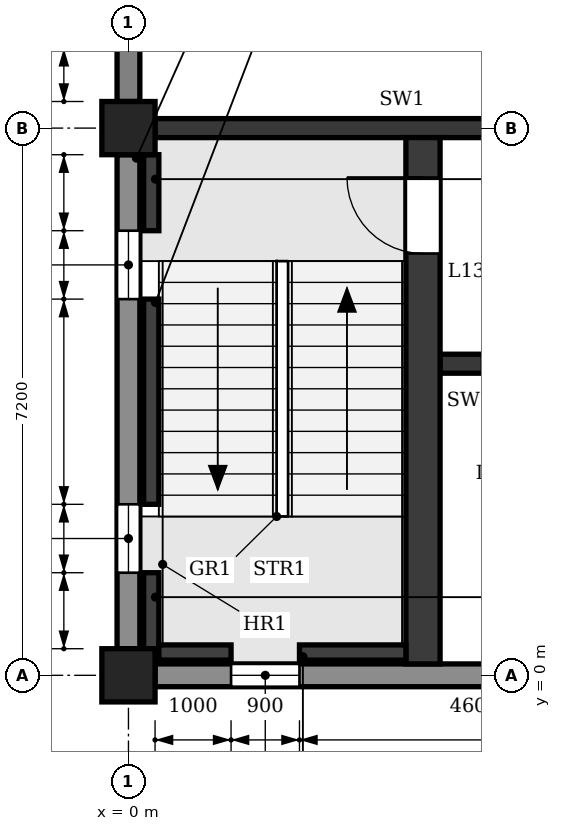
"""IFC4 building model, lengths in metres.
Left out: names, types, materials, properties, quantities, classifications, styles, units other than length and angle.
Written with IfcOpenShell. Run it as: python <this file> out.ifc"""

import sys

from ifc_helpers import new_model, si_unit, direction, frame, frame_2d, origin, origin_2d, place, context, subcontext, project, spatial, polyline, rectangle, outline, extrude, element, fill, save


model = new_model("IFC4")
c1 = context("Model", 3, precision=1e-05, world=origin(), true_north=direction((0.0, 1.0)))
c2 = subcontext(c1, "Body", "Model", "MODEL_VIEW")
j1 = project(units=[si_unit("LENGTHUNIT", "METRE"), si_unit("PLANEANGLEUNIT", "RADIAN")], contexts=[c1])
p1 = place(None, origin())
s1 = spatial("IfcSite", under=j1, at=p1, CompositionType="ELEMENT")
p2 = place(p1, origin())
s2 = spatial("IfcBuilding", under=s1, at=p2, CompositionType="ELEMENT")
p3 = place(p2, frame((0.0, 0.0, 63.3)))
s3 = spatial("IfcBuildingStorey", under=s2, at=p3, CompositionType="ELEMENT", Elevation=63.3)
for number, where, z_axis, x_axis in (
    (1, (0.0, 0.0, 0.0), (0.0, 0.0, 1.0), (1.0, 0.0, 0.0)),
    (2, (0.0, 7.2, 0.0), (0.0, 0.0, 1.0), (1.0, 0.0, 0.0)),
):
    element("IfcColumn", number, at=place(p3, frame(where, z_axis=z_axis, x_axis=x_axis)), inside=s3, PredefinedType="COLUMN", context=c2, shape_type="SweptSolid", body=[
        extrude(rectangle(XDim=0.7, YDim=0.7, at=origin_2d()), origin(), (0.0, 0.0, 1.0), 4.5),
    ])
p4 = place(p3, frame((0.0, 0.35, 0.0), z_axis=(0.0, 0.0, 1.0), x_axis=(0.0, 1.0, 0.0)))
e3 = element("IfcWall", 3, at=p4, inside=s3, PredefinedType="STANDARD", context=c2, shape_type="SweptSolid", body=[
    extrude(rectangle(XDim=6.5, YDim=0.3, at=frame_2d((3.25, 0.0))), origin(), (0.0, 0.0, 1.0), 3.65),
])
p5 = place(p4, frame((1.0, 0.0, 0.9)))
e4 = element("IfcOpeningElement", 4, at=p5, cuts=e3, PredefinedType="OPENING", context=c2, shape_type="SweptSolid", body=[
    extrude(outline(polyline([(0.0, 0.0), (0.9, 0.0), (0.9, 2.25), (0.45, 2.7), (0.0, 2.25), (0.0, 0.0)])), frame((0.0, 0.16, 0.0), z_axis=(0.0, -1.0, 0.0), x_axis=(1.0, 0.0, 0.0)), (0.0, 0.0, 1.0), 0.32),
])
p6 = place(p4, frame((4.6, 0.0, 0.9)))
e5 = element("IfcOpeningElement", 5, at=p6, cuts=e3, PredefinedType="OPENING", context=c2, shape_type="SweptSolid", body=[
    extrude(outline(polyline([(0.0, 0.0), (0.9, 0.0), (0.9, 2.25), (0.45, 2.7), (0.0, 2.25), (0.0, 0.0)])), frame((0.0, 0.16, 0.0), z_axis=(0.0, -1.0, 0.0), x_axis=(1.0, 0.0, 0.0)), (0.0, 0.0, 1.0), 0.32),
])
p7 = place(p3, frame((0.0, 7.55, 0.0), z_axis=(0.0, 0.0, 1.0), x_axis=(0.0, 1.0, 0.0)))
e6 = element("IfcWall", 6, at=p7, inside=s3, PredefinedType="STANDARD", context=c2, shape_type="SweptSolid", body=[
    extrude(rectangle(XDim=6.5, YDim=0.3, at=frame_2d((3.25, 0.0))), origin(), (0.0, 0.0, 1.0), 3.65),
])
p8 = place(p7, frame((0.7, 0.0, 0.9)))
e7 = element("IfcOpeningElement", 7, at=p8, cuts=e6, PredefinedType="OPENING", context=c2, shape_type="SweptSolid", body=[
    extrude(outline(polyline([(0.0, 0.0), (1.5, 0.0), (1.5, 1.95), (0.75, 2.7), (0.0, 1.95), (0.0, 0.0)])), frame((0.0, 0.16, 0.0), z_axis=(0.0, -1.0, 0.0), x_axis=(1.0, 0.0, 0.0)), (0.0, 0.0, 1.0), 0.32),
])
p9 = place(p7, frame((4.3, 0.0, 0.9)))
e8 = element("IfcOpeningElement", 8, at=p9, cuts=e6, PredefinedType="OPENING", context=c2, shape_type="SweptSolid", body=[
    extrude(outline(polyline([(0.0, 0.0), (1.5, 0.0), (1.5, 1.95), (0.75, 2.7), (0.0, 1.95), (0.0, 0.0)])), frame((0.0, 0.16, 0.0), z_axis=(0.0, -1.0, 0.0), x_axis=(1.0, 0.0, 0.0)), (0.0, 0.0, 1.0), 0.32),
])
p10 = place(p3, frame((0.35, 0.0, 0.0), z_axis=(0.0, 0.0, 1.0), x_axis=(1.0, 0.0, 0.0)))
e9 = element("IfcWall", 9, at=p10, inside=s3, PredefinedType="STANDARD", context=c2, shape_type="SweptSolid", body=[
    extrude(rectangle(XDim=6.5, YDim=0.3, at=frame_2d((3.25, 0.0))), origin(), (0.0, 0.0, 1.0), 3.65),
])
p11 = place(p10, frame((1.0, 0.0, 0.9)))
e10 = element("IfcOpeningElement", 10, at=p11, cuts=e9, PredefinedType="OPENING", context=c2, shape_type="SweptSolid", body=[
    extrude(outline(polyline([(0.0, 0.0), (0.9, 0.0), (0.9, 2.25), (0.45, 2.7), (0.0, 2.25), (0.0, 0.0)])), frame((0.0, 0.16, 0.0), z_axis=(0.0, -1.0, 0.0), x_axis=(1.0, 0.0, 0.0)), (0.0, 0.0, 1.0), 0.32),
])
p12 = place(p3, frame((0.35, 7.2, 0.0), z_axis=(0.0, 0.0, 1.0), x_axis=(1.0, 0.0, 0.0)))
e11 = element("IfcWall", 11, at=p12, inside=s3, PredefinedType="SHEAR", context=c2, shape_type="SweptSolid", body=[
    extrude(rectangle(XDim=6.5, YDim=0.25, at=frame_2d((3.25, 0.0))), origin(), (0.0, 0.0, 1.0), 3.6),
])
p13 = place(p12, frame((4.9, 0.0, 0.0)))
e12 = element("IfcOpeningElement", 12, at=p13, cuts=e11, PredefinedType="OPENING", context=c2, shape_type="SweptSolid", body=[
    extrude(rectangle(XDim=1.1, YDim=2.1, at=frame_2d((0.55, 1.05))), frame((0.0, 0.135, 0.0), z_axis=(0.0, -1.0, 0.0), x_axis=(1.0, 0.0, 0.0)), (0.0, 0.0, 1.0), 0.27),
])
p14 = place(p3, frame((0.3, 0.35, -0.25), z_axis=(0.0, 0.0, 1.0), x_axis=(0.0, 1.0, 0.0)))
e13 = element("IfcWall", 13, at=p14, inside=s3, PredefinedType="SHEAR", context=c2, shape_type="SweptSolid", body=[
    extrude(rectangle(XDim=1.0, YDim=0.2, at=frame_2d((0.5, 0.0))), origin(), (0.0, 0.0, 1.0), 4.5),
])
p15 = place(p3, frame((0.3, 2.25, -0.25), z_axis=(0.0, 0.0, 1.0), x_axis=(0.0, 1.0, 0.0)))
e14 = element("IfcWall", 14, at=p15, inside=s3, PredefinedType="SHEAR", context=c2, shape_type="SweptSolid", body=[
    extrude(rectangle(XDim=2.7, YDim=0.2, at=frame_2d((1.35, 0.0))), origin(), (0.0, 0.0, 1.0), 4.5),
])
p16 = place(p3, frame((0.3, 5.85, -0.25), z_axis=(0.0, 0.0, 1.0), x_axis=(0.0, 1.0, 0.0)))
e15 = element("IfcWall", 15, at=p16, inside=s3, PredefinedType="SHEAR", context=c2, shape_type="SweptSolid", body=[
    extrude(rectangle(XDim=1.0, YDim=0.2, at=frame_2d((0.5, 0.0))), origin(), (0.0, 0.0, 1.0), 4.5),
])
p17 = place(p3, frame((0.4, 0.3, -0.25), z_axis=(0.0, 0.0, 1.0), x_axis=(1.0, 0.0, 0.0)))
e16 = element("IfcWall", 16, at=p17, inside=s3, PredefinedType="SHEAR", context=c2, shape_type="SweptSolid", body=[
    extrude(rectangle(XDim=0.95, YDim=0.2, at=frame_2d((0.475, 0.0))), origin(), (0.0, 0.0, 1.0), 4.5),
])
p18 = place(p3, frame((2.25, 0.3, -0.25), z_axis=(0.0, 0.0, 1.0), x_axis=(1.0, 0.0, 0.0)))
e17 = element("IfcWall", 17, at=p18, inside=s3, PredefinedType="SHEAR", context=c2, shape_type="SweptSolid", body=[
    extrude(rectangle(XDim=1.4, YDim=0.2, at=frame_2d((0.7, 0.0))), origin(), (0.0, 0.0, 1.0), 4.5),
])
p19 = place(p3, frame((3.875, 0.15, 0.0), z_axis=(0.0, 0.0, 1.0), x_axis=(0.0, 1.0, 0.0)))
e18 = element("IfcWall", 18, at=p19, inside=s3, PredefinedType="SHEAR", context=c2, shape_type="SweptSolid", body=[
    extrude(rectangle(XDim=6.925, YDim=0.45, at=frame_2d((3.462, 0.0))), origin(), (0.0, 0.0, 1.0), 4.25),
])
p20 = place(p19, frame((5.4, 0.0, 0.0)))
e19 = element("IfcOpeningElement", 19, at=p20, cuts=e18, PredefinedType="OPENING", context=c2, shape_type="SweptSolid", body=[
    extrude(rectangle(XDim=1.0, YDim=2.1, at=frame_2d((0.5, 1.05))), frame((0.0, 0.235, 0.0), z_axis=(0.0, -1.0, 0.0), x_axis=(1.0, 0.0, 0.0)), (0.0, 0.0, 1.0), 0.47),
])
p21 = place(p3, frame((4.1, 4.1, 0.0), z_axis=(0.0, 0.0, 1.0), x_axis=(1.0, 0.0, 0.0)))
e20 = element("IfcWall", 20, at=p21, inside=s3, PredefinedType="SHEAR", context=c2, shape_type="SweptSolid", body=[
    extrude(rectangle(XDim=2.975, YDim=0.25, at=frame_2d((1.487, 0.0))), origin(), (0.0, 0.0, 1.0), 4.25),
])
p22 = place(p21, frame((0.55, 0.0, 0.0)))
e21 = element("IfcOpeningElement", 21, at=p22, cuts=e20, PredefinedType="OPENING", context=c2, shape_type="SweptSolid", body=[
    extrude(rectangle(XDim=0.9, YDim=2.1, at=frame_2d((0.45, 1.05))), frame((0.0, 0.135, 0.0), z_axis=(0.0, -1.0, 0.0), x_axis=(1.0, 0.0, 0.0)), (0.0, 0.0, 1.0), 0.27),
])
p23 = place(p11, origin())
e22 = element("IfcWindow", 22, at=p23, inside=s3, PartitioningType="SINGLE_PANEL", PredefinedType="WINDOW", context=c2, shape_type="SweptSolid", body=[
    extrude(outline(polyline([(0.0, 0.0), (0.9, 0.0), (0.9, 2.25), (0.45, 2.7), (0.0, 2.25), (0.0, 0.0)])), frame((0.0, 0.03, 0.0), z_axis=(0.0, -1.0, 0.0), x_axis=(1.0, 0.0, 0.0)), (0.0, 0.0, 1.0), 0.06),
])
fill(e10, e22)
p24 = place(p5, origin())
e23 = element("IfcWindow", 23, at=p24, inside=s3, PartitioningType="SINGLE_PANEL", PredefinedType="WINDOW", context=c2, shape_type="SweptSolid", body=[
    extrude(outline(polyline([(0.0, 0.0), (0.9, 0.0), (0.9, 2.25), (0.45, 2.7), (0.0, 2.25), (0.0, 0.0)])), frame((0.0, 0.03, 0.0), z_axis=(0.0, -1.0, 0.0), x_axis=(1.0, 0.0, 0.0)), (0.0, 0.0, 1.0), 0.06),
])
fill(e4, e23)
p25 = place(p6, origin())
e24 = element("IfcWindow", 24, at=p25, inside=s3, PartitioningType="SINGLE_PANEL", PredefinedType="WINDOW", context=c2, shape_type="SweptSolid", body=[
    extrude(outline(polyline([(0.0, 0.0), (0.9, 0.0), (0.9, 2.25), (0.45, 2.7), (0.0, 2.25), (0.0, 0.0)])), frame((0.0, 0.03, 0.0), z_axis=(0.0, -1.0, 0.0), x_axis=(1.0, 0.0, 0.0)), (0.0, 0.0, 1.0), 0.06),
])
fill(e5, e24)
p26 = place(p20, origin())
e25 = element("IfcDoor", 25, at=p26, inside=s3, OperationType="SINGLE_SWING_RIGHT", PredefinedType="DOOR", context=c2, shape_type="SweptSolid", body=[
    extrude(rectangle(XDim=1.0, YDim=2.1, at=frame_2d((0.5, 1.05))), frame((0.0, 0.025, 0.0), z_axis=(0.0, -1.0, 0.0), x_axis=(1.0, 0.0, 0.0)), (0.0, 0.0, 1.0), 0.05),
])
fill(e19, e25)
save(model, sys.argv[1])
